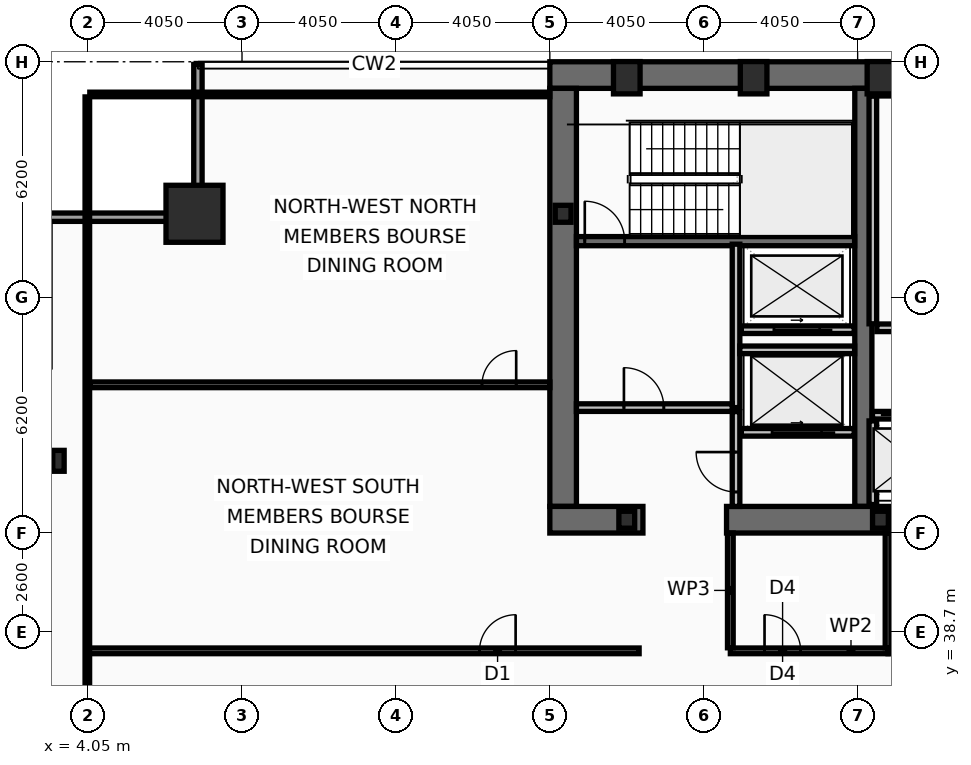
"""IFC4 building model, lengths in metres.
Left out: names, types, materials, properties, quantities, classifications, styles, units other than length and angle.
Written with IfcOpenShell. Run it as: python <this file> out.ifc"""

import sys

from ifc_helpers import new_model, si_unit, direction, frame, frame_2d, origin, origin_2d, place, context, subcontext, project, spatial, rectangle, hollow_rectangle, i_section, extrude, element, fill, save


model = new_model("IFC4")
c1 = context("Model", 3, precision=1e-05, world=origin(), true_north=direction((0.0, 1.0)))
c2 = subcontext(c1, "Body", "Model", "MODEL_VIEW")
j1 = project(units=[si_unit("LENGTHUNIT", "METRE"), si_unit("PLANEANGLEUNIT", "RADIAN")], contexts=[c1])
p1 = place(None, origin())
s1 = spatial("IfcSite", under=j1, at=p1, CompositionType="ELEMENT")
p2 = place(p1, origin())
s2 = spatial("IfcBuilding", under=s1, at=p2, CompositionType="ELEMENT")
p3 = place(p2, frame((0.0, 0.0, 114.6)))
s3 = spatial("IfcBuildingStorey", under=s2, at=p3, CompositionType="ELEMENT", Elevation=114.6)
p4 = place(p3, frame((16.2, 53.35, 0.0), z_axis=(0.0, 0.0, 1.0), x_axis=(1.0, 0.0, 0.0)))
e1 = element("IfcWall", 1, at=p4, inside=s3, PredefinedType="SHEAR", context=c2, shape_type="SweptSolid", body=[
    extrude(rectangle(XDim=40.5, YDim=0.7, at=frame_2d((20.25, 0.0))), origin(), (0.0, 0.0, 1.0), 3.44),
])
p5 = place(p3, frame((16.55, 42.0, 0.0), z_axis=(0.0, 0.0, 1.0), x_axis=(0.0, 1.0, 0.0)))
e2 = element("IfcWall", 2, at=p5, inside=s3, PredefinedType="SHEAR", context=c2, shape_type="SweptSolid", body=[
    extrude(rectangle(XDim=11.0, YDim=0.7, at=frame_2d((5.5, 0.0))), origin(), (0.0, 0.0, 1.0), 3.44),
])
p6 = place(p3, frame((24.45, 42.0, 0.0), z_axis=(0.0, 0.0, 1.0), x_axis=(0.0, 1.0, 0.0)))
e3 = element("IfcWall", 3, at=p6, inside=s3, PredefinedType="SHEAR", context=c2, shape_type="SweptSolid", body=[
    extrude(rectangle(XDim=11.0, YDim=0.45, at=frame_2d((5.5, 0.0))), origin(), (0.0, 0.0, 1.0), 3.44),
])
p7 = place(p3, frame((18.65, 41.65, 0.0), z_axis=(0.0, 0.0, 1.0), x_axis=(-1.0, 0.0, 0.0)))
e4 = element("IfcWall", 4, at=p7, inside=s3, PredefinedType="SHEAR", context=c2, shape_type="SweptSolid", body=[
    extrude(rectangle(XDim=2.45, YDim=0.7, at=frame_2d((1.225, 0.0))), origin(), (0.0, 0.0, 1.0), 3.44),
])
p8 = place(p3, frame((32.3, 41.65, 0.0), z_axis=(0.0, 0.0, 1.0), x_axis=(-1.0, 0.0, 0.0)))
e5 = element("IfcWall", 5, at=p8, inside=s3, PredefinedType="SHEAR", context=c2, shape_type="SweptSolid", body=[
    extrude(rectangle(XDim=11.45, YDim=0.7, at=frame_2d((5.725, 0.0))), origin(), (0.0, 0.0, 1.0), 3.44),
])
p9 = place(p3, frame((16.9, 48.98, 0.0), z_axis=(0.0, 0.0, 1.0), x_axis=(1.0, 0.0, 0.0)))
e6 = element("IfcWall", 6, at=p9, inside=s3, PredefinedType="SHEAR", context=c2, shape_type="SweptSolid", body=[
    extrude(rectangle(XDim=7.32, YDim=0.24, at=frame_2d((3.66, 0.0))), origin(), (0.0, 0.0, 1.0), 3.44),
])
p10 = place(p9, frame((0.22, 0.0, 0.0)))
e7 = element("IfcOpeningElement", 7, at=p10, cuts=e6, PredefinedType="OPENING", context=c2, shape_type="SweptSolid", body=[
    extrude(rectangle(XDim=1.05, YDim=2.15, at=frame_2d((0.525, 1.075))), frame((0.0, 0.13, 0.0), z_axis=(0.0, -1.0, 0.0), x_axis=(1.0, 0.0, 0.0)), (0.0, 0.0, 1.0), 0.26),
])
p11 = place(p3, frame((6.85, 49.7, 0.0), z_axis=(0.0, 0.0, 1.0), x_axis=(1.0, 0.0, 0.0)))
e8 = element("IfcColumn", 8, at=p11, inside=s3, PredefinedType="COLUMN", context=c2, shape_type="SweptSolid", body=[
    extrude(hollow_rectangle(XDim=1.5, YDim=1.5, WallThickness=0.07, at=origin_2d()), origin(), (0.0, 0.0, 1.0), 3.6),
])
for number, where, z_axis, x_axis in (
    (9, (18.225, 53.28, 0.0), (0.0, 0.0, 1.0), (1.0, 0.0, 0.0)),
    (10, (21.562, 53.28, 0.0), (0.0, 0.0, 1.0), (1.0, 0.0, 0.0)),
    (11, (24.9, 53.28, 0.0), (0.0, 0.0, 1.0), (1.0, 0.0, 0.0)),
):
    element("IfcColumn", number, at=place(p3, frame(where, z_axis=z_axis, x_axis=x_axis)), inside=s3, PredefinedType="COLUMN", context=c2, shape_type="SweptSolid", body=[
        extrude(hollow_rectangle(XDim=0.7, YDim=0.85, WallThickness=0.05, at=origin_2d()), origin(), (0.0, 0.0, 1.0), 3.6),
    ])
p12 = place(p3, frame((3.27, 43.2, 0.0), z_axis=(0.0, 0.0, 1.0), x_axis=(1.0, 0.0, 0.0)))
e12 = element("IfcColumn", 12, at=p12, inside=s3, PredefinedType="COLUMN", context=c2, shape_type="SweptSolid", body=[
    extrude(i_section(OverallWidth=0.3, OverallDepth=0.55, WebThickness=0.015, FlangeThickness=0.029, at=origin_2d()), origin(), (0.0, 0.0, 1.0), 3.6),
])
for number, where, z_axis, x_axis in (
    (13, (16.55, 49.7, 0.0), (0.0, 0.0, 1.0), (1.0, 0.0, 0.0)),
    (14, (18.225, 41.65, 0.0), (0.0, 0.0, 1.0), (1.0, 0.0, 0.0)),
    (15, (24.9, 41.65, 0.0), (0.0, 0.0, 1.0), (1.0, 0.0, 0.0)),
):
    element("IfcColumn", number, at=place(p3, frame(where, z_axis=z_axis, x_axis=x_axis)), inside=s3, PredefinedType="COLUMN", context=c2, shape_type="SweptSolid", body=[
        extrude(i_section(OverallWidth=0.416, OverallDepth=0.446, WebThickness=0.039, FlangeThickness=0.063, at=origin_2d()), origin(), (0.0, 0.0, 1.0), 3.6),
    ])
p13 = place(p3, frame((2.83, 49.61, 0.0), z_axis=(0.0, 0.0, 1.0), x_axis=(1.0, 0.0, 0.0)))
e16 = element("IfcWall", 16, at=p13, inside=s3, PredefinedType="SOLIDWALL", context=c2, shape_type="SweptSolid", body=[
    extrude(rectangle(XDim=4.22, YDim=0.22, at=frame_2d((2.11, 0.0))), origin(), (0.0, 0.0, 1.0), 2.83),
])
p14 = place(p3, frame((6.94, 49.72, 0.0), z_axis=(0.0, 0.0, 1.0), x_axis=(0.0, 1.0, 0.0)))
e17 = element("IfcWall", 17, at=p14, inside=s3, PredefinedType="SOLIDWALL", context=c2, shape_type="SweptSolid", body=[
    extrude(rectangle(XDim=3.91, YDim=0.22, at=frame_2d((1.955, 0.0))), origin(), (0.0, 0.0, 1.0), 2.83),
])
p15 = place(p3, frame((24.69, 44.4, 0.0), z_axis=(0.0, 0.0, 1.0), x_axis=(1.0, 0.0, 0.0)))
e18 = element("IfcWall", 18, at=p15, inside=s3, PredefinedType="PARTITIONING", context=c2, shape_type="SweptSolid", body=[
    extrude(rectangle(XDim=6.53, YDim=0.2, at=frame_2d((3.265, 0.0))), origin(), (0.0, 0.0, 1.0), 3.44),
])
p16 = place(p15, frame((0.53, 0.0, 0.0)))
e19 = element("IfcOpeningElement", 19, at=p16, cuts=e18, PredefinedType="OPENING", context=c2, shape_type="SweptSolid", body=[
    extrude(rectangle(XDim=1.1, YDim=2.18, at=frame_2d((0.55, 1.09))), frame((0.0, 0.11, 0.0), z_axis=(0.0, -1.0, 0.0), x_axis=(1.0, 0.0, 0.0)), (0.0, 0.0, 1.0), 0.22),
])
p17 = place(p15, frame((2.69, 0.0, 0.0)))
e20 = element("IfcOpeningElement", 20, at=p17, cuts=e18, PredefinedType="OPENING", context=c2, shape_type="SweptSolid", body=[
    extrude(rectangle(XDim=1.1, YDim=2.18, at=frame_2d((0.55, 1.09))), frame((0.0, 0.11, 0.0), z_axis=(0.0, -1.0, 0.0), x_axis=(1.0, 0.0, 0.0)), (0.0, 0.0, 1.0), 0.22),
])
p18 = place(p15, frame((4.85, 0.0, 0.0)))
e21 = element("IfcOpeningElement", 21, at=p18, cuts=e18, PredefinedType="OPENING", context=c2, shape_type="SweptSolid", body=[
    extrude(rectangle(XDim=1.1, YDim=2.18, at=frame_2d((0.55, 1.09))), frame((0.0, 0.11, 0.0), z_axis=(0.0, -1.0, 0.0), x_axis=(1.0, 0.0, 0.0)), (0.0, 0.0, 1.0), 0.22),
])
p19 = place(p3, frame((24.21, 43.95, 0.0), z_axis=(0.0, 0.0, 1.0), x_axis=(-1.0, 0.0, 0.0)))
e22 = element("IfcWall", 22, at=p19, inside=s3, PredefinedType="PARTITIONING", context=c2, shape_type="SweptSolid", body=[
    extrude(rectangle(XDim=2.97, YDim=0.2, at=frame_2d((1.485, 0.0))), origin(), (0.0, 0.0, 1.0), 3.44),
])
p20 = place(p19, frame((0.86, 0.0, 0.0)))
e23 = element("IfcOpeningElement", 23, at=p20, cuts=e22, PredefinedType="OPENING", context=c2, shape_type="SweptSolid", body=[
    extrude(rectangle(XDim=1.3, YDim=2.18, at=frame_2d((0.65, 1.09))), frame((0.0, 0.11, 0.0), z_axis=(0.0, -1.0, 0.0), x_axis=(1.0, 0.0, 0.0)), (0.0, 0.0, 1.0), 0.22),
])
p21 = place(p3, frame((24.21, 46.65, 0.0), z_axis=(0.0, 0.0, 1.0), x_axis=(-1.0, 0.0, 0.0)))
e24 = element("IfcWall", 24, at=p21, inside=s3, PredefinedType="PARTITIONING", context=c2, shape_type="SweptSolid", body=[
    extrude(rectangle(XDim=2.97, YDim=0.2, at=frame_2d((1.485, 0.0))), origin(), (0.0, 0.0, 1.0), 3.44),
])
p22 = place(p21, frame((0.91, 0.0, 0.0)))
e25 = element("IfcOpeningElement", 25, at=p22, cuts=e24, PredefinedType="OPENING", context=c2, shape_type="SweptSolid", body=[
    extrude(rectangle(XDim=1.2, YDim=2.18, at=frame_2d((0.6, 1.09))), frame((0.0, 0.11, 0.0), z_axis=(0.0, -1.0, 0.0), x_axis=(1.0, 0.0, 0.0)), (0.0, 0.0, 1.0), 0.22),
])
p23 = place(p3, frame((21.1, 44.6, 0.0), z_axis=(0.0, 0.0, 1.0), x_axis=(0.0, 1.0, 0.0)))
e26 = element("IfcWall", 26, at=p23, inside=s3, PredefinedType="PARTITIONING", context=c2, shape_type="SweptSolid", body=[
    extrude(rectangle(XDim=4.3, YDim=0.2, at=frame_2d((2.15, 0.0))), origin(), (0.0, 0.0, 1.0), 3.44),
])
p24 = place(p3, frame((16.9, 44.6, 0.0), z_axis=(0.0, 0.0, 1.0), x_axis=(1.0, 0.0, 0.0)))
e27 = element("IfcWall", 27, at=p24, inside=s3, PredefinedType="PARTITIONING", context=c2, shape_type="SweptSolid", body=[
    extrude(rectangle(XDim=4.1, YDim=0.2, at=frame_2d((2.05, 0.0))), origin(), (0.0, 0.0, 1.0), 3.44),
])
p25 = place(p24, frame((1.25, 0.0, 0.0)))
e28 = element("IfcOpeningElement", 28, at=p25, cuts=e27, PredefinedType="OPENING", context=c2, shape_type="SweptSolid", body=[
    extrude(rectangle(XDim=1.05, YDim=2.15, at=frame_2d((0.525, 1.075))), frame((0.0, 0.11, 0.0), z_axis=(0.0, -1.0, 0.0), x_axis=(1.0, 0.0, 0.0)), (0.0, 0.0, 1.0), 0.22),
])
p26 = place(p3, frame((21.2, 46.12, 0.0), z_axis=(0.0, 0.0, 1.0), x_axis=(1.0, 0.0, 0.0)))
e29 = element("IfcWall", 29, at=p26, inside=s3, PredefinedType="PARTITIONING", context=c2, shape_type="SweptSolid", body=[
    extrude(rectangle(XDim=3.02, YDim=0.2, at=frame_2d((1.51, 0.0))), origin(), (0.0, 0.0, 1.0), 3.44),
])
p27 = place(p3, frame((21.1, 42.0, 0.0), z_axis=(0.0, 0.0, 1.0), x_axis=(0.0, 1.0, 0.0)))
e30 = element("IfcWall", 30, at=p27, inside=s3, PredefinedType="PARTITIONING", context=c2, shape_type="SweptSolid", body=[
    extrude(rectangle(XDim=2.495, YDim=0.2, at=frame_2d((1.248, 0.0))), origin(), (0.0, 0.0, 1.0), 3.44),
])
p28 = place(p27, frame((0.38, 0.0, 0.0)))
e31 = element("IfcOpeningElement", 31, at=p28, cuts=e30, PredefinedType="OPENING", context=c2, shape_type="SweptSolid", body=[
    extrude(rectangle(XDim=1.05, YDim=2.15, at=frame_2d((0.525, 1.075))), frame((0.0, 0.11, 0.0), z_axis=(0.0, -1.0, 0.0), x_axis=(1.0, 0.0, 0.0)), (0.0, 0.0, 1.0), 0.22),
])
p29 = place(p3, frame((24.7, 46.805, 0.0), z_axis=(0.0, 0.0, 1.0), x_axis=(0.0, 1.0, 0.0)))
e32 = element("IfcWall", 32, at=p29, inside=s3, PredefinedType="PARTITIONING", context=c2, shape_type="SweptSolid", body=[
    extrude(rectangle(XDim=5.99, YDim=0.2, at=frame_2d((2.995, 0.0))), origin(), (0.0, 0.0, 1.0), 3.44),
])
p30 = place(p3, frame((24.805, 52.86, 0.0), z_axis=(0.0, 0.0, 1.0), x_axis=(1.0, 0.0, 0.0)))
e33 = element("IfcWall", 33, at=p30, inside=s3, PredefinedType="PARTITIONING", context=c2, shape_type="SweptSolid", body=[
    extrude(rectangle(XDim=7.51, YDim=0.12, at=frame_2d((3.755, 0.0))), origin(), (0.0, 0.0, 1.0), 3.44),
])
p31 = place(p3, frame((24.805, 46.7, 0.0), z_axis=(0.0, 0.0, 1.0), x_axis=(1.0, 0.0, 0.0)))
e34 = element("IfcWall", 34, at=p31, inside=s3, PredefinedType="PARTITIONING", context=c2, shape_type="SweptSolid", body=[
    extrude(rectangle(XDim=7.51, YDim=0.2, at=frame_2d((3.755, 0.0))), origin(), (0.0, 0.0, 1.0), 3.44),
])
p32 = place(p31, frame((1.15, 0.0, 0.0)))
e35 = element("IfcOpeningElement", 35, at=p32, cuts=e34, PredefinedType="OPENING", context=c2, shape_type="SweptSolid", body=[
    extrude(rectangle(XDim=0.95, YDim=2.1, at=frame_2d((0.475, 1.05))), frame((0.0, 0.11, 0.0), z_axis=(0.0, -1.0, 0.0), x_axis=(1.0, 0.0, 0.0)), (0.0, 0.0, 1.0), 0.22),
])
p33 = place(p31, frame((5.336, 0.0, 0.0)))
e36 = element("IfcOpeningElement", 36, at=p33, cuts=e34, PredefinedType="OPENING", context=c2, shape_type="SweptSolid", body=[
    extrude(rectangle(XDim=0.95, YDim=2.1, at=frame_2d((0.475, 1.05))), frame((0.0, 0.11, 0.0), z_axis=(0.0, -1.0, 0.0), x_axis=(1.0, 0.0, 0.0)), (0.0, 0.0, 1.0), 0.22),
])
p34 = place(p3, frame((24.7, 42.05, 0.0), z_axis=(0.0, 0.0, 1.0), x_axis=(0.0, 1.0, 0.0)))
e37 = element("IfcWall", 37, at=p34, inside=s3, PredefinedType="PARTITIONING", context=c2, shape_type="SweptSolid", body=[
    extrude(rectangle(XDim=2.2, YDim=0.2, at=frame_2d((1.1, 0.0))), origin(), (0.0, 0.0, 1.0), 3.44),
])
p35 = place(p3, frame((20.95, 38.2, 0.0), z_axis=(0.0, 0.0, 1.0), x_axis=(1.0, 0.0, 0.0)))
e38 = element("IfcWall", 38, at=p35, inside=s3, PredefinedType="PARTITIONING", context=c2, shape_type="SweptSolid", body=[
    extrude(rectangle(XDim=4.15, YDim=0.15, at=frame_2d((2.075, 0.0))), origin(), (0.0, 0.0, 1.0), 2.73),
])
p36 = place(p35, frame((0.9, 0.0, 0.0)))
e39 = element("IfcOpeningElement", 39, at=p36, cuts=e38, PredefinedType="OPENING", context=c2, shape_type="SweptSolid", body=[
    extrude(rectangle(XDim=0.95, YDim=2.05, at=frame_2d((0.475, 1.025))), frame((0.0, 0.085, 0.0), z_axis=(0.0, -1.0, 0.0), x_axis=(1.0, 0.0, 0.0)), (0.0, 0.0, 1.0), 0.17),
])
p37 = place(p3, frame((25.1, 38.2, 0.0), z_axis=(0.0, 0.0, 1.0), x_axis=(1.0, 0.0, 0.0)))
e40 = element("IfcWall", 40, at=p37, inside=s3, PredefinedType="PARTITIONING", context=c2, shape_type="SweptSolid", body=[
    extrude(rectangle(XDim=4.1, YDim=0.15, at=frame_2d((2.05, 0.0))), origin(), (0.0, 0.0, 1.0), 2.73),
])
p38 = place(p37, frame((0.9, 0.0, 0.0)))
e41 = element("IfcOpeningElement", 41, at=p38, cuts=e40, PredefinedType="OPENING", context=c2, shape_type="SweptSolid", body=[
    extrude(rectangle(XDim=0.95, YDim=2.05, at=frame_2d((0.475, 1.025))), frame((0.0, 0.085, 0.0), z_axis=(0.0, -1.0, 0.0), x_axis=(1.0, 0.0, 0.0)), (0.0, 0.0, 1.0), 0.17),
])
p39 = place(p3, frame((20.95, 38.28, 0.0), z_axis=(0.0, 0.0, 1.0), x_axis=(0.0, 1.0, 0.0)))
e42 = element("IfcWall", 42, at=p39, inside=s3, PredefinedType="PARTITIONING", context=c2, shape_type="SweptSolid", body=[
    extrude(rectangle(XDim=3.02, YDim=0.15, at=frame_2d((1.51, 0.0))), origin(), (0.0, 0.0, 1.0), 3.44),
])
p40 = place(p3, frame((25.1, 38.28, 0.0), z_axis=(0.0, 0.0, 1.0), x_axis=(0.0, 1.0, 0.0)))
e43 = element("IfcWall", 43, at=p40, inside=s3, PredefinedType="PARTITIONING", context=c2, shape_type="SweptSolid", body=[
    extrude(rectangle(XDim=3.02, YDim=0.15, at=frame_2d((1.51, 0.0))), origin(), (0.0, 0.0, 1.0), 2.73),
])
p41 = place(p3, frame((4.03, 38.2, 0.0), z_axis=(0.0, 0.0, 1.0), x_axis=(1.0, 0.0, 0.0)))
e44 = element("IfcWall", 44, at=p41, inside=s3, PredefinedType="PARTITIONING", context=c2, shape_type="SweptSolid", body=[
    extrude(rectangle(XDim=14.52, YDim=0.15, at=frame_2d((7.26, 0.0))), origin(), (0.0, 0.0, 1.0), 2.73),
])
p42 = place(p41, frame((10.32, 0.0, 0.0)))
e45 = element("IfcOpeningElement", 45, at=p42, cuts=e44, PredefinedType="OPENING", context=c2, shape_type="SweptSolid", body=[
    extrude(rectangle(XDim=0.95, YDim=2.05, at=frame_2d((0.475, 1.025))), frame((0.0, 0.085, 0.0), z_axis=(0.0, -1.0, 0.0), x_axis=(1.0, 0.0, 0.0)), (0.0, 0.0, 1.0), 0.17),
])
p43 = place(p3, frame((4.095, 45.2, 0.0), z_axis=(0.0, 0.0, 1.0), x_axis=(1.0, 0.0, 0.0)))
e46 = element("IfcWall", 46, at=p43, inside=s3, PredefinedType="PARTITIONING", context=c2, shape_type="SweptSolid", body=[
    extrude(rectangle(XDim=12.105, YDim=0.15, at=frame_2d((6.052, 0.0))), origin(), (0.0, 0.0, 1.0), 2.83),
])
p44 = place(p43, frame((10.32, 0.0, 0.0)))
e47 = element("IfcOpeningElement", 47, at=p44, cuts=e46, PredefinedType="OPENING", context=c2, shape_type="SweptSolid", body=[
    extrude(rectangle(XDim=0.9, YDim=2.05, at=frame_2d((0.45, 1.025))), frame((0.0, 0.085, 0.0), z_axis=(0.0, -1.0, 0.0), x_axis=(1.0, 0.0, 0.0)), (0.0, 0.0, 1.0), 0.17),
])
p45 = place(p3, frame((4.03, 10.665, 0.0), z_axis=(0.0, 0.0, 1.0), x_axis=(0.0, 1.0, 0.0)))
e48 = element("IfcWall", 48, at=p45, inside=s3, PredefinedType="PARTITIONING", context=c2, shape_type="SweptSolid", body=[
    extrude(rectangle(XDim=42.11, YDim=0.12, at=frame_2d((21.055, 0.0))), origin(), (0.0, 0.0, 1.0), 2.73),
])
p46 = place(p3, frame((4.095, 52.84, 0.0), z_axis=(0.0, 0.0, 1.0), x_axis=(1.0, 0.0, 0.0)))
e49 = element("IfcWall", 49, at=p46, inside=s3, PredefinedType="PARTITIONING", context=c2, shape_type="SweptSolid", body=[
    extrude(rectangle(XDim=12.105, YDim=0.12, at=frame_2d((6.052, 0.0))), origin(), (0.0, 0.0, 1.0), 3.44),
])
p47 = place(p10, origin())
e50 = element("IfcDoor", 50, at=p47, inside=s3, OperationType="SINGLE_SWING_LEFT", PredefinedType="DOOR", context=c2, shape_type="SweptSolid", body=[
    extrude(rectangle(XDim=1.05, YDim=2.15, at=frame_2d((0.525, 1.075))), frame((0.0, 0.025, 0.0), z_axis=(0.0, -1.0, 0.0), x_axis=(1.0, 0.0, 0.0)), (0.0, 0.0, 1.0), 0.05),
])
fill(e7, e50)
p48 = place(p20, origin())
e51 = element("IfcDoor", 51, at=p48, inside=s3, OperationType="SLIDING_TO_LEFT", PredefinedType="DOOR", context=c2, shape_type="SweptSolid", body=[
    extrude(rectangle(XDim=1.3, YDim=2.18, at=frame_2d((0.65, 1.09))), frame((0.0, 0.025, 0.0), z_axis=(0.0, -1.0, 0.0), x_axis=(1.0, 0.0, 0.0)), (0.0, 0.0, 1.0), 0.05),
])
fill(e23, e51)
p49 = place(p22, origin())
e52 = element("IfcDoor", 52, at=p49, inside=s3, OperationType="SLIDING_TO_LEFT", PredefinedType="DOOR", context=c2, shape_type="SweptSolid", body=[
    extrude(rectangle(XDim=1.2, YDim=2.18, at=frame_2d((0.6, 1.09))), frame((0.0, 0.025, 0.0), z_axis=(0.0, -1.0, 0.0), x_axis=(1.0, 0.0, 0.0)), (0.0, 0.0, 1.0), 0.05),
])
fill(e25, e52)
p50 = place(p25, origin())
e53 = element("IfcDoor", 53, at=p50, inside=s3, OperationType="SINGLE_SWING_LEFT", PredefinedType="DOOR", context=c2, shape_type="SweptSolid", body=[
    extrude(rectangle(XDim=1.05, YDim=2.15, at=frame_2d((0.525, 1.075))), frame((0.0, 0.025, 0.0), z_axis=(0.0, -1.0, 0.0), x_axis=(1.0, 0.0, 0.0)), (0.0, 0.0, 1.0), 0.05),
])
fill(e28, e53)
p51 = place(p28, origin())
e54 = element("IfcDoor", 54, at=p51, inside=s3, OperationType="SINGLE_SWING_RIGHT", PredefinedType="DOOR", context=c2, shape_type="SweptSolid", body=[
    extrude(rectangle(XDim=1.05, YDim=2.15, at=frame_2d((0.525, 1.075))), frame((0.0, 0.025, 0.0), z_axis=(0.0, -1.0, 0.0), x_axis=(1.0, 0.0, 0.0)), (0.0, 0.0, 1.0), 0.05),
])
fill(e31, e54)
p52 = place(p36, origin())
e55 = element("IfcDoor", 55, at=p52, inside=s3, OperationType="SINGLE_SWING_LEFT", PredefinedType="DOOR", context=c2, shape_type="SweptSolid", body=[
    extrude(rectangle(XDim=0.95, YDim=2.05, at=frame_2d((0.475, 1.025))), frame((0.0, 0.025, 0.0), z_axis=(0.0, -1.0, 0.0), x_axis=(1.0, 0.0, 0.0)), (0.0, 0.0, 1.0), 0.05),
])
fill(e39, e55)
p53 = place(p42, origin())
e56 = element("IfcDoor", 56, at=p53, inside=s3, OperationType="SINGLE_SWING_RIGHT", PredefinedType="DOOR", context=c2, shape_type="SweptSolid", body=[
    extrude(rectangle(XDim=0.95, YDim=2.05, at=frame_2d((0.475, 1.025))), frame((0.0, 0.025, 0.0), z_axis=(0.0, -1.0, 0.0), x_axis=(1.0, 0.0, 0.0)), (0.0, 0.0, 1.0), 0.05),
])
fill(e45, e56)
p54 = place(p44, origin())
e57 = element("IfcDoor", 57, at=p54, inside=s3, OperationType="SINGLE_SWING_RIGHT", PredefinedType="DOOR", context=c2, shape_type="SweptSolid", body=[
    extrude(rectangle(XDim=0.9, YDim=2.05, at=frame_2d((0.45, 1.025))), frame((0.0, 0.025, 0.0), z_axis=(0.0, -1.0, 0.0), x_axis=(1.0, 0.0, 0.0)), (0.0, 0.0, 1.0), 0.05),
])
fill(e47, e57)
save(model, sys.argv[1])
